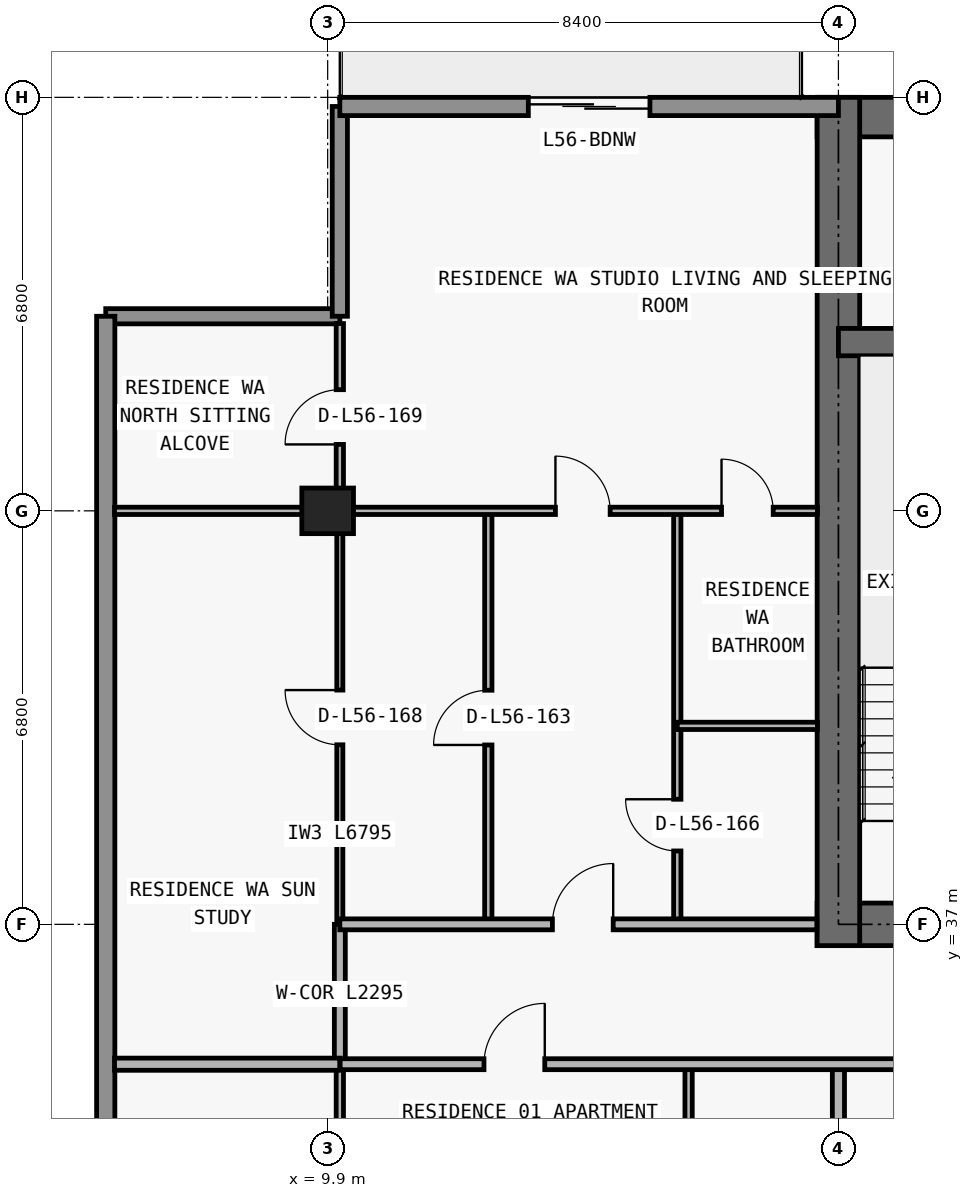
"""IFC4 building model, lengths in metres.
Left out: names, types, materials, properties, quantities, classifications, styles, units other than length and angle.
Written with IfcOpenShell. Run it as: python <this file> out.ifc"""

import sys

from ifc_helpers import new_model, si_unit, direction, frame, frame_2d, origin, origin_2d, place, context, subcontext, project, spatial, rectangle, extrude, element, fill, save


model = new_model("IFC4")
c1 = context("Model", 3, precision=1e-05, world=origin(), true_north=direction((0.0, 1.0)))
c2 = subcontext(c1, "Body", "Model", "MODEL_VIEW")
j1 = project(units=[si_unit("LENGTHUNIT", "METRE"), si_unit("PLANEANGLEUNIT", "RADIAN")], contexts=[c1])
p1 = place(None, origin())
s1 = spatial("IfcSite", under=j1, at=p1, CompositionType="ELEMENT")
p2 = place(p1, origin())
s2 = spatial("IfcBuilding", under=s1, at=p2, CompositionType="ELEMENT")
p3 = place(p2, frame((0.0, 0.0, 201.6)))
s3 = spatial("IfcBuildingStorey", under=s2, at=p3, CompositionType="ELEMENT", Elevation=201.6)
p4 = place(p3, frame((9.9, 43.8, 0.0), z_axis=(0.0, 0.0, 1.0), x_axis=(1.0, 0.0, 0.0)))
e1 = element("IfcColumn", 1, at=p4, inside=s3, PredefinedType="COLUMN", context=c2, shape_type="SweptSolid", body=[
    extrude(rectangle(XDim=0.85, YDim=0.75, at=origin_2d()), origin(), (0.0, 0.0, 1.0), 3.05),
])
p5 = place(p3, frame((17.95, 37.0, 0.0), z_axis=(0.0, 0.0, 1.0), x_axis=(1.0, 0.0, 0.0)))
e2 = element("IfcWall", 2, at=p5, inside=s3, PredefinedType="SHEAR", context=c2, shape_type="SweptSolid", body=[
    extrude(rectangle(XDim=41.9, YDim=0.7, at=frame_2d((20.95, 0.0))), origin(), (0.0, 0.0, 1.0), 3.05),
])
p6 = place(p5, frame((14.35, 0.0, 0.0)))
e3 = element("IfcOpeningElement", 3, at=p6, cuts=e2, PredefinedType="OPENING", context=c2, shape_type="SweptSolid", body=[
    extrude(rectangle(XDim=1.1, YDim=2.15, at=frame_2d((0.55, 1.075))), frame((0.0, 0.36, 0.0), z_axis=(0.0, -1.0, 0.0), x_axis=(1.0, 0.0, 0.0)), (0.0, 0.0, 1.0), 0.72),
])
p7 = place(p5, frame((6.2, 0.0, 0.0)))
e4 = element("IfcOpeningElement", 4, at=p7, cuts=e2, PredefinedType="OPENING", context=c2, shape_type="SweptSolid", body=[
    extrude(rectangle(XDim=1.05, YDim=2.15, at=frame_2d((0.525, 1.075))), frame((0.0, 0.36, 0.0), z_axis=(0.0, -1.0, 0.0), x_axis=(1.0, 0.0, 0.0)), (0.0, 0.0, 1.0), 0.72),
])
p8 = place(p5, frame((34.7, 0.0, 0.0)))
e5 = element("IfcOpeningElement", 5, at=p8, cuts=e2, PredefinedType="OPENING", context=c2, shape_type="SweptSolid", body=[
    extrude(rectangle(XDim=1.05, YDim=2.15, at=frame_2d((0.525, 1.075))), frame((0.0, 0.36, 0.0), z_axis=(0.0, -1.0, 0.0), x_axis=(1.0, 0.0, 0.0)), (0.0, 0.0, 1.0), 0.72),
])
p9 = place(p5, frame((10.812, 0.0, 0.0)))
e6 = element("IfcOpeningElement", 6, at=p9, cuts=e2, PredefinedType="OPENING", context=c2, shape_type="SweptSolid", body=[
    extrude(rectangle(XDim=1.05, YDim=2.15, at=frame_2d((0.525, 1.075))), frame((0.0, 0.36, 0.0), z_axis=(0.0, -1.0, 0.0), x_axis=(1.0, 0.0, 0.0)), (0.0, 0.0, 1.0), 0.72),
])
p10 = place(p5, frame((24.05, 0.0, 0.0)))
e7 = element("IfcOpeningElement", 7, at=p10, cuts=e2, PredefinedType="OPENING", context=c2, shape_type="SweptSolid", body=[
    extrude(rectangle(XDim=1.05, YDim=2.15, at=frame_2d((0.525, 1.075))), frame((0.0, 0.36, 0.0), z_axis=(0.0, -1.0, 0.0), x_axis=(1.0, 0.0, 0.0)), (0.0, 0.0, 1.0), 0.72),
])
p11 = place(p3, frame((17.95, 50.275, 0.0), z_axis=(0.0, 0.0, 1.0), x_axis=(1.0, 0.0, 0.0)))
e8 = element("IfcWall", 8, at=p11, inside=s3, PredefinedType="SHEAR", context=c2, shape_type="SweptSolid", body=[
    extrude(rectangle(XDim=41.9, YDim=0.65, at=frame_2d((20.95, 0.0))), origin(), (0.0, 0.0, 1.0), 3.05),
])
p12 = place(p3, frame((18.3, 36.65, 0.0), z_axis=(0.0, 0.0, 1.0), x_axis=(0.0, 1.0, 0.0)))
e9 = element("IfcWall", 9, at=p12, inside=s3, PredefinedType="SHEAR", context=c2, shape_type="SweptSolid", body=[
    extrude(rectangle(XDim=13.95, YDim=0.7, at=frame_2d((6.975, 0.0))), origin(), (0.0, 0.0, 1.0), 3.05),
])
p13 = place(p3, frame((18.3, 46.575, 0.0), z_axis=(0.0, 0.0, 1.0), x_axis=(1.0, 0.0, 0.0)))
e10 = element("IfcWall", 10, at=p13, inside=s3, PredefinedType="SHEAR", context=c2, shape_type="SweptSolid", body=[
    extrude(rectangle(XDim=41.2, YDim=0.45, at=frame_2d((20.6, 0.0))), origin(), (0.0, 0.0, 1.0), 3.05),
])
p14 = place(p13, frame((7.6, 0.0, 0.0)))
e11 = element("IfcOpeningElement", 11, at=p14, cuts=e10, PredefinedType="OPENING", context=c2, shape_type="SweptSolid", body=[
    extrude(rectangle(XDim=1.0, YDim=2.2, at=frame_2d((0.5, 1.1))), frame((0.0, 0.235, 0.0), z_axis=(0.0, -1.0, 0.0), x_axis=(1.0, 0.0, 0.0)), (0.0, 0.0, 1.0), 0.47),
])
p15 = place(p13, frame((32.625, 0.0, 0.0)))
e12 = element("IfcOpeningElement", 12, at=p15, cuts=e10, PredefinedType="OPENING", context=c2, shape_type="SweptSolid", body=[
    extrude(rectangle(XDim=1.05, YDim=2.15, at=frame_2d((0.525, 1.075))), frame((0.0, 0.235, 0.0), z_axis=(0.0, -1.0, 0.0), x_axis=(1.0, 0.0, 0.0)), (0.0, 0.0, 1.0), 0.47),
])
p16 = place(p3, frame((6.25, 47.0, 0.0), z_axis=(0.0, 0.0, 1.0), x_axis=(1.0, 0.0, 0.0)))
e13 = element("IfcWall", 13, at=p16, inside=s3, PredefinedType="ELEMENTEDWALL", context=c2, shape_type="SweptSolid", body=[
    extrude(rectangle(XDim=3.85, YDim=0.25, at=frame_2d((1.925, 0.0))), origin(), (0.0, 0.0, 1.0), 3.05),
])
p17 = place(p3, frame((10.1, 47.0, 0.0), z_axis=(0.0, 0.0, 1.0), x_axis=(0.0, 1.0, 0.0)))
e14 = element("IfcWall", 14, at=p17, inside=s3, PredefinedType="ELEMENTEDWALL", context=c2, shape_type="SweptSolid", body=[
    extrude(rectangle(XDim=3.45, YDim=0.25, at=frame_2d((1.725, 0.0))), origin(), (0.0, 0.0, 1.0), 3.05),
])
p18 = place(p3, frame((6.25, 29.1, 0.0), z_axis=(0.0, 0.0, 1.0), x_axis=(0.0, 1.0, 0.0)))
e15 = element("IfcWall", 15, at=p18, inside=s3, PredefinedType="STANDARD", context=c2, shape_type="SweptSolid", body=[
    extrude(rectangle(XDim=17.9, YDim=0.3, at=frame_2d((8.95, 0.0))), origin(), (0.0, 0.0, 1.0), 3.05),
])
p19 = place(p3, frame((10.1, 50.45, 0.0), z_axis=(0.0, 0.0, 1.0), x_axis=(1.0, 0.0, 0.0)))
e16 = element("IfcWall", 16, at=p19, inside=s3, PredefinedType="STANDARD", context=c2, shape_type="SweptSolid", body=[
    extrude(rectangle(XDim=8.2, YDim=0.3, at=frame_2d((4.1, 0.0))), origin(), (0.0, 0.0, 1.0), 3.05),
])
p20 = place(p19, frame((3.1, 0.0, 0.0)))
e17 = element("IfcOpeningElement", 17, at=p20, cuts=e16, PredefinedType="OPENING", context=c2, shape_type="SweptSolid", body=[
    extrude(rectangle(XDim=2.0, YDim=2.3, at=frame_2d((1.0, 1.15))), frame((0.0, 0.16, 0.0), z_axis=(0.0, -1.0, 0.0), x_axis=(1.0, 0.0, 0.0)), (0.0, 0.0, 1.0), 0.32),
])
p21 = place(p3, frame((10.1, 11.285, 0.0), z_axis=(0.0, 0.0, 1.0), x_axis=(0.0, 1.0, 0.0)))
e18 = element("IfcWall", 18, at=p21, inside=s3, PredefinedType="PARTITIONING", context=c2, shape_type="SweptSolid", body=[
    extrude(rectangle(XDim=23.415, YDim=0.12, at=frame_2d((11.708, 0.0))), origin(), (0.0, 0.0, 1.0), 2.263),
])
p22 = place(p21, frame((16.21, 0.0, 0.0)))
e19 = element("IfcOpeningElement", 19, at=p22, cuts=e18, PredefinedType="OPENING", context=c2, shape_type="SweptSolid", body=[
    extrude(rectangle(XDim=0.9, YDim=2.15, at=frame_2d((0.45, 1.075))), frame((0.0, 0.07, 0.0), z_axis=(0.0, -1.0, 0.0), x_axis=(1.0, 0.0, 0.0)), (0.0, 0.0, 1.0), 0.14),
])
p23 = place(p3, frame((10.1, 34.705, 0.0), z_axis=(0.0, 0.0, 1.0), x_axis=(0.0, 1.0, 0.0)))
e20 = element("IfcWall", 20, at=p23, inside=s3, PredefinedType="PARTITIONING", context=c2, shape_type="SweptSolid", body=[
    extrude(rectangle(XDim=2.295, YDim=0.18, at=frame_2d((1.147, 0.0))), origin(), (0.0, 0.0, 1.0), 2.263),
])
p24 = place(p3, frame((10.1, 37.005, 0.0), z_axis=(0.0, 0.0, 1.0), x_axis=(0.0, 1.0, 0.0)))
e21 = element("IfcWall", 21, at=p24, inside=s3, PredefinedType="MOVABLE", context=c2, shape_type="SweptSolid", body=[
    extrude(rectangle(XDim=6.795, YDim=0.1, at=frame_2d((3.397, 0.0))), origin(), (0.0, 0.0, 1.0), 2.263),
])
p25 = place(p24, frame((2.948, 0.0, 0.0)))
e22 = element("IfcOpeningElement", 22, at=p25, cuts=e21, PredefinedType="OPENING", context=c2, shape_type="SweptSolid", body=[
    extrude(rectangle(XDim=0.9, YDim=2.15, at=frame_2d((0.45, 1.075))), frame((0.0, 0.06, 0.0), z_axis=(0.0, -1.0, 0.0), x_axis=(1.0, 0.0, 0.0)), (0.0, 0.0, 1.0), 0.12),
])
p26 = place(p3, frame((10.1, 43.805, 0.0), z_axis=(0.0, 0.0, 1.0), x_axis=(0.0, 1.0, 0.0)))
e23 = element("IfcWall", 23, at=p26, inside=s3, PredefinedType="PARTITIONING", context=c2, shape_type="SweptSolid", body=[
    extrude(rectangle(XDim=3.075, YDim=0.12, at=frame_2d((1.538, 0.0))), origin(), (0.0, 0.0, 1.0), 3.05),
])
p27 = place(p26, frame((1.087, 0.0, 0.0)))
e24 = element("IfcOpeningElement", 24, at=p27, cuts=e23, PredefinedType="OPENING", context=c2, shape_type="SweptSolid", body=[
    extrude(rectangle(XDim=0.9, YDim=2.15, at=frame_2d((0.45, 1.075))), frame((0.0, 0.07, 0.0), z_axis=(0.0, -1.0, 0.0), x_axis=(1.0, 0.0, 0.0)), (0.0, 0.0, 1.0), 0.14),
])
p28 = place(p3, frame((12.542, 37.0, 0.0), z_axis=(0.0, 0.0, 1.0), x_axis=(0.0, 1.0, 0.0)))
e25 = element("IfcWall", 25, at=p28, inside=s3, PredefinedType="PARTITIONING", context=c2, shape_type="SweptSolid", body=[
    extrude(rectangle(XDim=6.8, YDim=0.12, at=frame_2d((3.4, 0.0))), origin(), (0.0, 0.0, 1.0), 2.578),
])
p29 = place(p28, frame((2.95, 0.0, 0.0)))
e26 = element("IfcOpeningElement", 26, at=p29, cuts=e25, PredefinedType="OPENING", context=c2, shape_type="SweptSolid", body=[
    extrude(rectangle(XDim=0.9, YDim=2.15, at=frame_2d((0.45, 1.075))), frame((0.0, 0.07, 0.0), z_axis=(0.0, -1.0, 0.0), x_axis=(1.0, 0.0, 0.0)), (0.0, 0.0, 1.0), 0.14),
])
p30 = place(p3, frame((15.65, 37.0, 0.0), z_axis=(0.0, 0.0, 1.0), x_axis=(0.0, 1.0, 0.0)))
e27 = element("IfcWall", 27, at=p30, inside=s3, PredefinedType="PARTITIONING", context=c2, shape_type="SweptSolid", body=[
    extrude(rectangle(XDim=6.8, YDim=0.12, at=frame_2d((3.4, 0.0))), origin(), (0.0, 0.0, 1.0), 2.679),
])
p31 = place(p30, frame((1.207, 0.0, 0.0)))
e28 = element("IfcOpeningElement", 28, at=p31, cuts=e27, PredefinedType="OPENING", context=c2, shape_type="SweptSolid", body=[
    extrude(rectangle(XDim=0.85, YDim=2.1, at=frame_2d((0.425, 1.05))), frame((0.0, 0.07, 0.0), z_axis=(0.0, -1.0, 0.0), x_axis=(1.0, 0.0, 0.0)), (0.0, 0.0, 1.0), 0.14),
])
p32 = place(p3, frame((15.836, 30.52, 0.0), z_axis=(0.0, 0.0, 1.0), x_axis=(0.0, 1.0, 0.0)))
e29 = element("IfcWall", 29, at=p32, inside=s3, PredefinedType="PARTITIONING", context=c2, shape_type="SweptSolid", body=[
    extrude(rectangle(XDim=4.18, YDim=0.12, at=frame_2d((2.09, 0.0))), origin(), (0.0, 0.0, 1.0), 3.05),
])
p33 = place(p32, frame((1.665, 0.0, 0.0)))
e30 = element("IfcOpeningElement", 30, at=p33, cuts=e29, PredefinedType="OPENING", context=c2, shape_type="SweptSolid", body=[
    extrude(rectangle(XDim=0.85, YDim=2.1, at=frame_2d((0.425, 1.05))), frame((0.0, 0.07, 0.0), z_axis=(0.0, -1.0, 0.0), x_axis=(1.0, 0.0, 0.0)), (0.0, 0.0, 1.0), 0.14),
])
p34 = place(p3, frame((18.3, 11.24, 0.0), z_axis=(0.0, 0.0, 1.0), x_axis=(0.0, 1.0, 0.0)))
e31 = element("IfcWall", 31, at=p34, inside=s3, PredefinedType="PARTITIONING", context=c2, shape_type="SweptSolid", body=[
    extrude(rectangle(XDim=23.46, YDim=0.2, at=frame_2d((11.73, 0.0))), origin(), (0.0, 0.0, 1.0), 2.263),
])
p35 = place(p3, frame((6.395, 34.7, 0.0), z_axis=(0.0, 0.0, 1.0), x_axis=(1.0, 0.0, 0.0)))
e32 = element("IfcWall", 32, at=p35, inside=s3, PredefinedType="PARTITIONING", context=c2, shape_type="SweptSolid", body=[
    extrude(rectangle(XDim=3.705, YDim=0.2, at=frame_2d((1.853, 0.0))), origin(), (0.0, 0.0, 1.0), 3.05),
])
p36 = place(p3, frame((10.105, 34.7, 0.0), z_axis=(0.0, 0.0, 1.0), x_axis=(1.0, 0.0, 0.0)))
e33 = element("IfcWall", 33, at=p36, inside=s3, PredefinedType="PARTITIONING", context=c2, shape_type="SweptSolid", body=[
    extrude(rectangle(XDim=31.021, YDim=0.18, at=frame_2d((15.51, 0.0))), origin(), (0.0, 0.0, 1.0), 3.05),
])
p37 = place(p36, frame((2.365, 0.0, 0.0)))
e34 = element("IfcOpeningElement", 34, at=p37, cuts=e33, PredefinedType="OPENING", context=c2, shape_type="SweptSolid", body=[
    extrude(rectangle(XDim=1.0, YDim=2.2, at=frame_2d((0.5, 1.1))), frame((0.0, 0.1, 0.0), z_axis=(0.0, -1.0, 0.0), x_axis=(1.0, 0.0, 0.0)), (0.0, 0.0, 1.0), 0.2),
])
p38 = place(p36, frame((10.833, 0.0, 0.0)))
e35 = element("IfcOpeningElement", 35, at=p38, cuts=e33, PredefinedType="OPENING", context=c2, shape_type="SweptSolid", body=[
    extrude(rectangle(XDim=1.0, YDim=2.2, at=frame_2d((0.5, 1.1))), frame((0.0, 0.1, 0.0), z_axis=(0.0, -1.0, 0.0), x_axis=(1.0, 0.0, 0.0)), (0.0, 0.0, 1.0), 0.2),
])
p39 = place(p36, frame((19.422, 0.0, 0.0)))
e36 = element("IfcOpeningElement", 36, at=p39, cuts=e33, PredefinedType="OPENING", context=c2, shape_type="SweptSolid", body=[
    extrude(rectangle(XDim=1.0, YDim=2.2, at=frame_2d((0.5, 1.1))), frame((0.0, 0.1, 0.0), z_axis=(0.0, -1.0, 0.0), x_axis=(1.0, 0.0, 0.0)), (0.0, 0.0, 1.0), 0.2),
])
p40 = place(p3, frame((10.1, 37.0, 0.0), z_axis=(0.0, 0.0, 1.0), x_axis=(1.0, 0.0, 0.0)))
e37 = element("IfcWall", 37, at=p40, inside=s3, PredefinedType="PARTITIONING", context=c2, shape_type="SweptSolid", body=[
    extrude(rectangle(XDim=7.845, YDim=0.18, at=frame_2d((3.922, 0.0))), origin(), (0.0, 0.0, 1.0), 3.05),
])
p41 = place(p40, frame((3.496, 0.0, 0.0)))
e38 = element("IfcOpeningElement", 38, at=p41, cuts=e37, PredefinedType="OPENING", context=c2, shape_type="SweptSolid", body=[
    extrude(rectangle(XDim=1.0, YDim=2.2, at=frame_2d((0.5, 1.1))), frame((0.0, 0.1, 0.0), z_axis=(0.0, -1.0, 0.0), x_axis=(1.0, 0.0, 0.0)), (0.0, 0.0, 1.0), 0.2),
])
p42 = place(p3, frame((15.65, 40.264, 0.0), z_axis=(0.0, 0.0, 1.0), x_axis=(1.0, 0.0, 0.0)))
e39 = element("IfcWall", 39, at=p42, inside=s3, PredefinedType="PARTITIONING", context=c2, shape_type="SweptSolid", body=[
    extrude(rectangle(XDim=2.305, YDim=0.12, at=frame_2d((1.153, 0.0))), origin(), (0.0, 0.0, 1.0), 3.05),
])
p43 = place(p3, frame((6.395, 43.8, 0.0), z_axis=(0.0, 0.0, 1.0), x_axis=(1.0, 0.0, 0.0)))
e40 = element("IfcWall", 40, at=p43, inside=s3, PredefinedType="PARTITIONING", context=c2, shape_type="SweptSolid", body=[
    extrude(rectangle(XDim=11.56, YDim=0.12, at=frame_2d((5.78, 0.0))), origin(), (0.0, 0.0, 1.0), 2.418),
])
p44 = place(p43, frame((7.251, 0.0, 0.0)))
e41 = element("IfcOpeningElement", 41, at=p44, cuts=e40, PredefinedType="OPENING", context=c2, shape_type="SweptSolid", body=[
    extrude(rectangle(XDim=0.9, YDim=2.15, at=frame_2d((0.45, 1.075))), frame((0.0, 0.07, 0.0), z_axis=(0.0, -1.0, 0.0), x_axis=(1.0, 0.0, 0.0)), (0.0, 0.0, 1.0), 0.14),
])
p45 = place(p43, frame((9.982, 0.0, 0.0)))
e42 = element("IfcOpeningElement", 42, at=p45, cuts=e40, PredefinedType="OPENING", context=c2, shape_type="SweptSolid", body=[
    extrude(rectangle(XDim=0.85, YDim=2.1, at=frame_2d((0.425, 1.05))), frame((0.0, 0.07, 0.0), z_axis=(0.0, -1.0, 0.0), x_axis=(1.0, 0.0, 0.0)), (0.0, 0.0, 1.0), 0.14),
])
p46 = place(p20, origin())
e43 = element("IfcDoor", 43, at=p46, inside=s3, OperationType="DOUBLE_DOOR_SLIDING", PredefinedType="DOOR", context=c2, shape_type="SweptSolid", body=[
    extrude(rectangle(XDim=2.0, YDim=2.3, at=frame_2d((1.0, 1.15))), frame((0.0, 0.025, 0.0), z_axis=(0.0, -1.0, 0.0), x_axis=(1.0, 0.0, 0.0)), (0.0, 0.0, 1.0), 0.05),
])
fill(e17, e43)
p47 = place(p37, origin())
e44 = element("IfcDoor", 44, at=p47, inside=s3, OperationType="SINGLE_SWING_RIGHT", PredefinedType="DOOR", context=c2, shape_type="SweptSolid", body=[
    extrude(rectangle(XDim=1.0, YDim=2.2, at=frame_2d((0.5, 1.1))), frame((0.0, 0.025, 0.0), z_axis=(0.0, -1.0, 0.0), x_axis=(1.0, 0.0, 0.0)), (0.0, 0.0, 1.0), 0.05),
])
fill(e34, e44)
p48 = place(p29, origin())
e45 = element("IfcDoor", 45, at=p48, inside=s3, OperationType="SINGLE_SWING_LEFT", PredefinedType="DOOR", context=c2, shape_type="SweptSolid", body=[
    extrude(rectangle(XDim=0.9, YDim=2.15, at=frame_2d((0.45, 1.075))), frame((0.0, 0.025, 0.0), z_axis=(0.0, -1.0, 0.0), x_axis=(1.0, 0.0, 0.0)), (0.0, 0.0, 1.0), 0.05),
])
fill(e26, e45)
p49 = place(p41, origin())
e46 = element("IfcDoor", 46, at=p49, inside=s3, OperationType="SINGLE_SWING_RIGHT", PredefinedType="DOOR", context=c2, shape_type="SweptSolid", body=[
    extrude(rectangle(XDim=1.0, YDim=2.2, at=frame_2d((0.5, 1.1))), frame((0.0, 0.025, 0.0), z_axis=(0.0, -1.0, 0.0), x_axis=(1.0, 0.0, 0.0)), (0.0, 0.0, 1.0), 0.05),
])
fill(e38, e46)
p50 = place(p44, origin())
e47 = element("IfcDoor", 47, at=p50, inside=s3, OperationType="SINGLE_SWING_LEFT", PredefinedType="DOOR", context=c2, shape_type="SweptSolid", body=[
    extrude(rectangle(XDim=0.9, YDim=2.15, at=frame_2d((0.45, 1.075))), frame((0.0, 0.025, 0.0), z_axis=(0.0, -1.0, 0.0), x_axis=(1.0, 0.0, 0.0)), (0.0, 0.0, 1.0), 0.05),
])
fill(e41, e47)
p51 = place(p31, origin())
e48 = element("IfcDoor", 48, at=p51, inside=s3, OperationType="SINGLE_SWING_RIGHT", PredefinedType="DOOR", context=c2, shape_type="SweptSolid", body=[
    extrude(rectangle(XDim=0.85, YDim=2.1, at=frame_2d((0.425, 1.05))), frame((0.0, 0.025, 0.0), z_axis=(0.0, -1.0, 0.0), x_axis=(1.0, 0.0, 0.0)), (0.0, 0.0, 1.0), 0.05),
])
fill(e28, e48)
p52 = place(p45, origin())
e49 = element("IfcDoor", 49, at=p52, inside=s3, OperationType="SINGLE_SWING_LEFT", PredefinedType="DOOR", context=c2, shape_type="SweptSolid", body=[
    extrude(rectangle(XDim=0.85, YDim=2.1, at=frame_2d((0.425, 1.05))), frame((0.0, 0.025, 0.0), z_axis=(0.0, -1.0, 0.0), x_axis=(1.0, 0.0, 0.0)), (0.0, 0.0, 1.0), 0.05),
])
fill(e42, e49)
p53 = place(p25, origin())
e50 = element("IfcDoor", 50, at=p53, inside=s3, OperationType="SINGLE_SWING_RIGHT", PredefinedType="DOOR", context=c2, shape_type="SweptSolid", body=[
    extrude(rectangle(XDim=0.9, YDim=2.15, at=frame_2d((0.45, 1.075))), frame((0.0, 0.025, 0.0), z_axis=(0.0, -1.0, 0.0), x_axis=(1.0, 0.0, 0.0)), (0.0, 0.0, 1.0), 0.05),
])
fill(e22, e50)
p54 = place(p27, origin())
e51 = element("IfcDoor", 51, at=p54, inside=s3, OperationType="SINGLE_SWING_LEFT", PredefinedType="DOOR", context=c2, shape_type="SweptSolid", body=[
    extrude(rectangle(XDim=0.9, YDim=2.15, at=frame_2d((0.45, 1.075))), frame((0.0, 0.025, 0.0), z_axis=(0.0, -1.0, 0.0), x_axis=(1.0, 0.0, 0.0)), (0.0, 0.0, 1.0), 0.05),
])
fill(e24, e51)
save(model, sys.argv[1])
